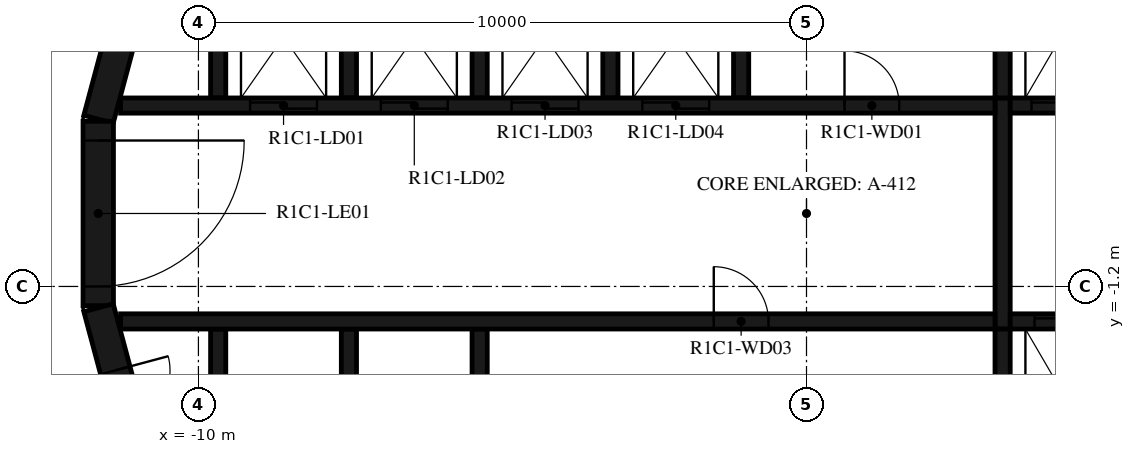
"""IFC4 building model, lengths in metres.
Left out: names, types, materials, properties, quantities, classifications, styles, units other than length and angle.
Written with IfcOpenShell. Run it as: python <this file> out.ifc"""

import sys

from ifc_helpers import new_model, si_unit, direction, frame, frame_2d, origin, place, context, subcontext, project, spatial, polyline, rectangle, outline, extrude, element, fill, save


model = new_model("IFC4")
c1 = context("Model", 3, precision=1e-05, world=origin(), true_north=direction((0.0, 1.0)))
c2 = subcontext(c1, "Body", "Model", "MODEL_VIEW")
j1 = project(units=[si_unit("LENGTHUNIT", "METRE"), si_unit("PLANEANGLEUNIT", "RADIAN")], contexts=[c1])
p1 = place(None, origin())
s1 = spatial("IfcSite", under=j1, at=p1, CompositionType="ELEMENT")
p2 = place(p1, origin())
s2 = spatial("IfcBuilding", under=s1, at=p2, CompositionType="ELEMENT")
p3 = place(p2, frame((0.0, 0.0, 62.9)))
s3 = spatial("IfcBuildingStorey", under=s2, at=p3, CompositionType="ELEMENT", Elevation=62.9)
p4 = place(p3, frame((-10.858, 4.479, 0.0), z_axis=(0.0, 0.0, 1.0), x_axis=(-0.258734743916, -0.965948410781, 0.0)))
e1 = element("IfcWall", 1, at=p4, inside=s3, PredefinedType="SHEAR", context=c2, shape_type="SweptSolid", body=[
    extrude(rectangle(XDim=3.033, YDim=0.5, at=frame_2d((1.516, 0.0))), origin(), (0.0, 0.0, 1.0), 3.12),
])
p5 = place(p3, frame((-11.647, 1.516, 0.0), z_axis=(0.0, 0.0, 1.0), x_axis=(0.0, -1.0, 0.0)))
e2 = element("IfcWall", 2, at=p5, inside=s3, PredefinedType="SHEAR", context=c2, shape_type="SweptSolid", body=[
    extrude(rectangle(XDim=3.033, YDim=0.5, at=frame_2d((1.516, 0.0))), origin(), (0.0, 0.0, 1.0), 3.12),
])
p6 = place(p5, frame((0.316, 0.0, 0.0)))
e3 = element("IfcOpeningElement", 3, at=p6, cuts=e2, PredefinedType="OPENING", context=c2, shape_type="SweptSolid", body=[
    extrude(rectangle(XDim=2.4, YDim=2.1, at=frame_2d((1.2, 1.05))), frame((0.0, 0.26, 0.0), z_axis=(0.0, -1.0, 0.0), x_axis=(1.0, 0.0, 0.0)), (0.0, 0.0, 1.0), 0.52),
])
p7 = place(p3, frame((-11.643, -1.55, 0.0), z_axis=(0.0, 0.0, 1.0), x_axis=(0.258734743916, -0.965948410781, 0.0)))
e4 = element("IfcWall", 4, at=p7, inside=s3, PredefinedType="SHEAR", context=c2, shape_type="SweptSolid", body=[
    extrude(rectangle(XDim=3.033, YDim=0.5, at=frame_2d((1.516, 0.0))), origin(), (0.0, 0.0, 1.0), 3.12),
])
p8 = place(p7, frame((1.066, 0.0, 0.0)))
e5 = element("IfcOpeningElement", 5, at=p8, cuts=e4, PredefinedType="OPENING", context=c2, shape_type="SweptSolid", body=[
    extrude(rectangle(XDim=0.9, YDim=2.1, at=frame_2d((0.45, 1.05))), frame((0.0, 0.26, 0.0), z_axis=(0.0, -1.0, 0.0), x_axis=(1.0, 0.0, 0.0)), (0.0, 0.0, 1.0), 0.52),
])
p9 = place(p3, origin())
e6 = element("IfcWall", 6, at=p9, inside=s3, PredefinedType="SHEAR", context=c2, shape_type="SweptSolid", body=[
    extrude(outline(polyline([(-9.55, 4.8), (-7.65, 4.8), (-7.65, 1.9), (-7.4, 1.9), (-7.4, 4.8), (-5.5, 4.8), (-5.5, 1.9), (-5.25, 1.9), (-5.25, 4.8), (-3.35, 4.8), (-3.35, 1.9), (-3.1, 1.9), (-3.1, 4.8), (-1.2, 4.8), (-1.2, 1.9), (-0.95, 1.9), (-0.95, 4.8), (3.1, 4.8), (3.1, 1.9), (3.35, 1.9), (3.35, 4.8), (5.25, 4.8), (5.25, 1.9), (5.5, 1.9), (5.5, 4.8), (7.4, 4.8), (7.4, 1.9), (7.65, 1.9), (7.65, 4.8), (9.55, 4.8), (9.55, 1.9), (9.8, 1.9), (9.8, 4.8), (9.8, 5.05), (-9.8, 5.05), (-9.8, 4.8), (-9.8, 1.9), (-9.55, 1.9), (-9.55, 4.8)])), origin(), (0.0, 0.0, 1.0), 3.12),
])
p10 = place(p3, origin())
e7 = element("IfcWall", 7, at=p10, inside=s3, PredefinedType="SHEAR", context=c2, shape_type="SweptSolid", body=[
    extrude(outline(polyline([(9.8, -5.05), (9.8, -4.8), (9.8, -1.9), (9.55, -1.9), (9.55, -4.8), (7.65, -4.8), (7.65, -1.9), (7.4, -1.9), (7.4, -4.8), (5.5, -4.8), (5.5, -1.9), (5.25, -1.9), (5.25, -4.8), (3.35, -4.8), (3.35, -1.9), (3.1, -1.9), (3.1, -4.8), (-5.25, -4.8), (-5.25, -1.9), (-5.5, -1.9), (-5.5, -4.8), (-7.4, -4.8), (-7.4, -1.9), (-7.65, -1.9), (-7.65, -4.8), (-9.55, -4.8), (-9.55, -1.9), (-9.8, -1.9), (-9.8, -4.8), (-9.8, -5.05), (9.8, -5.05)])), origin(), (0.0, 0.0, 1.0), 3.12),
])
p11 = place(p3, frame((-11.28, 1.775, 0.0), z_axis=(0.0, 0.0, 1.0), x_axis=(1.0, 0.0, 0.0)))
e8 = element("IfcWall", 8, at=p11, inside=s3, PredefinedType="SHEAR", context=c2, shape_type="SweptSolid", body=[
    extrude(rectangle(XDim=14.38, YDim=0.25, at=frame_2d((7.19, 0.0))), origin(), (0.0, 0.0, 1.0), 3.12),
])
p12 = place(p11, frame((2.13, 0.0, 0.0)))
e9 = element("IfcOpeningElement", 9, at=p12, cuts=e8, PredefinedType="OPENING", context=c2, shape_type="SweptSolid", body=[
    extrude(rectangle(XDim=1.1, YDim=2.1, at=frame_2d((0.55, 1.05))), frame((0.0, 0.135, 0.0), z_axis=(0.0, -1.0, 0.0), x_axis=(1.0, 0.0, 0.0)), (0.0, 0.0, 1.0), 0.27),
])
p13 = place(p11, frame((4.28, 0.0, 0.0)))
e10 = element("IfcOpeningElement", 10, at=p13, cuts=e8, PredefinedType="OPENING", context=c2, shape_type="SweptSolid", body=[
    extrude(rectangle(XDim=1.1, YDim=2.1, at=frame_2d((0.55, 1.05))), frame((0.0, 0.135, 0.0), z_axis=(0.0, -1.0, 0.0), x_axis=(1.0, 0.0, 0.0)), (0.0, 0.0, 1.0), 0.27),
])
p14 = place(p11, frame((6.43, 0.0, 0.0)))
e11 = element("IfcOpeningElement", 11, at=p14, cuts=e8, PredefinedType="OPENING", context=c2, shape_type="SweptSolid", body=[
    extrude(rectangle(XDim=1.1, YDim=2.1, at=frame_2d((0.55, 1.05))), frame((0.0, 0.135, 0.0), z_axis=(0.0, -1.0, 0.0), x_axis=(1.0, 0.0, 0.0)), (0.0, 0.0, 1.0), 0.27),
])
p15 = place(p11, frame((8.58, 0.0, 0.0)))
e12 = element("IfcOpeningElement", 12, at=p15, cuts=e8, PredefinedType="OPENING", context=c2, shape_type="SweptSolid", body=[
    extrude(rectangle(XDim=1.1, YDim=2.1, at=frame_2d((0.55, 1.05))), frame((0.0, 0.135, 0.0), z_axis=(0.0, -1.0, 0.0), x_axis=(1.0, 0.0, 0.0)), (0.0, 0.0, 1.0), 0.27),
])
p16 = place(p11, frame((11.905, 0.0, 0.0)))
e13 = element("IfcOpeningElement", 13, at=p16, cuts=e8, PredefinedType="OPENING", context=c2, shape_type="SweptSolid", body=[
    extrude(rectangle(XDim=0.9, YDim=2.1, at=frame_2d((0.45, 1.05))), frame((0.0, 0.135, 0.0), z_axis=(0.0, -1.0, 0.0), x_axis=(1.0, 0.0, 0.0)), (0.0, 0.0, 1.0), 0.27),
])
p17 = place(p3, frame((3.35, 1.775, 0.0), z_axis=(0.0, 0.0, 1.0), x_axis=(1.0, 0.0, 0.0)))
e14 = element("IfcWall", 14, at=p17, inside=s3, PredefinedType="SHEAR", context=c2, shape_type="SweptSolid", body=[
    extrude(rectangle(XDim=7.93, YDim=0.25, at=frame_2d((3.965, 0.0))), origin(), (0.0, 0.0, 1.0), 3.12),
])
p18 = place(p17, frame((0.35, 0.0, 0.0)))
e15 = element("IfcOpeningElement", 15, at=p18, cuts=e14, PredefinedType="OPENING", context=c2, shape_type="SweptSolid", body=[
    extrude(rectangle(XDim=1.2, YDim=2.4, at=frame_2d((0.6, 1.2))), frame((0.0, 0.135, 0.0), z_axis=(0.0, -1.0, 0.0), x_axis=(1.0, 0.0, 0.0)), (0.0, 0.0, 1.0), 0.27),
])
p19 = place(p17, frame((2.5, 0.0, 0.0)))
e16 = element("IfcOpeningElement", 16, at=p19, cuts=e14, PredefinedType="OPENING", context=c2, shape_type="SweptSolid", body=[
    extrude(rectangle(XDim=1.2, YDim=2.4, at=frame_2d((0.6, 1.2))), frame((0.0, 0.135, 0.0), z_axis=(0.0, -1.0, 0.0), x_axis=(1.0, 0.0, 0.0)), (0.0, 0.0, 1.0), 0.27),
])
p20 = place(p17, frame((4.8, 0.0, 0.0)))
e17 = element("IfcOpeningElement", 17, at=p20, cuts=e14, PredefinedType="OPENING", context=c2, shape_type="SweptSolid", body=[
    extrude(rectangle(XDim=0.9, YDim=2.1, at=frame_2d((0.45, 1.05))), frame((0.0, 0.135, 0.0), z_axis=(0.0, -1.0, 0.0), x_axis=(1.0, 0.0, 0.0)), (0.0, 0.0, 1.0), 0.27),
])
p21 = place(p3, frame((-11.28, -1.775, 0.0), z_axis=(0.0, 0.0, 1.0), x_axis=(1.0, 0.0, 0.0)))
e18 = element("IfcWall", 18, at=p21, inside=s3, PredefinedType="SHEAR", context=c2, shape_type="SweptSolid", body=[
    extrude(rectangle(XDim=14.38, YDim=0.25, at=frame_2d((7.19, 0.0))), origin(), (0.0, 0.0, 1.0), 3.12),
])
p22 = place(p21, frame((9.755, 0.0, 0.0)))
e19 = element("IfcOpeningElement", 19, at=p22, cuts=e18, PredefinedType="OPENING", context=c2, shape_type="SweptSolid", body=[
    extrude(rectangle(XDim=0.9, YDim=2.1, at=frame_2d((0.45, 1.05))), frame((0.0, 0.135, 0.0), z_axis=(0.0, -1.0, 0.0), x_axis=(1.0, 0.0, 0.0)), (0.0, 0.0, 1.0), 0.27),
])
p23 = place(p3, frame((3.35, -1.775, 0.0), z_axis=(0.0, 0.0, 1.0), x_axis=(1.0, 0.0, 0.0)))
e20 = element("IfcWall", 20, at=p23, inside=s3, PredefinedType="SHEAR", context=c2, shape_type="SweptSolid", body=[
    extrude(rectangle(XDim=7.93, YDim=0.25, at=frame_2d((3.965, 0.0))), origin(), (0.0, 0.0, 1.0), 3.12),
])
p24 = place(p23, frame((0.4, 0.0, 0.0)))
e21 = element("IfcOpeningElement", 21, at=p24, cuts=e20, PredefinedType="OPENING", context=c2, shape_type="SweptSolid", body=[
    extrude(rectangle(XDim=1.1, YDim=2.4, at=frame_2d((0.55, 1.2))), frame((0.0, 0.135, 0.0), z_axis=(0.0, -1.0, 0.0), x_axis=(1.0, 0.0, 0.0)), (0.0, 0.0, 1.0), 0.27),
])
p25 = place(p23, frame((2.55, 0.0, 0.0)))
e22 = element("IfcOpeningElement", 22, at=p25, cuts=e20, PredefinedType="OPENING", context=c2, shape_type="SweptSolid", body=[
    extrude(rectangle(XDim=1.1, YDim=2.4, at=frame_2d((0.55, 1.2))), frame((0.0, 0.135, 0.0), z_axis=(0.0, -1.0, 0.0), x_axis=(1.0, 0.0, 0.0)), (0.0, 0.0, 1.0), 0.27),
])
p26 = place(p23, frame((4.7, 0.0, 0.0)))
e23 = element("IfcOpeningElement", 23, at=p26, cuts=e20, PredefinedType="OPENING", context=c2, shape_type="SweptSolid", body=[
    extrude(rectangle(XDim=1.1, YDim=2.4, at=frame_2d((0.55, 1.2))), frame((0.0, 0.135, 0.0), z_axis=(0.0, -1.0, 0.0), x_axis=(1.0, 0.0, 0.0)), (0.0, 0.0, 1.0), 0.27),
])
p27 = place(p3, frame((3.225, -1.9, 0.0), z_axis=(0.0, 0.0, 1.0), x_axis=(0.0, 1.0, 0.0)))
e24 = element("IfcWall", 24, at=p27, inside=s3, PredefinedType="SHEAR", context=c2, shape_type="SweptSolid", body=[
    extrude(rectangle(XDim=3.8, YDim=0.25, at=frame_2d((1.9, 0.0))), origin(), (0.0, 0.0, 1.0), 3.12),
])
p28 = place(p6, origin())
e25 = element("IfcDoor", 25, at=p28, inside=s3, OperationType="DOUBLE_DOOR_SINGLE_SWING", PredefinedType="DOOR", context=c2, shape_type="SweptSolid", body=[
    extrude(rectangle(XDim=2.4, YDim=2.1, at=frame_2d((1.2, 1.05))), frame((0.0, 0.025, 0.0), z_axis=(0.0, -1.0, 0.0), x_axis=(1.0, 0.0, 0.0)), (0.0, 0.0, 1.0), 0.05),
])
fill(e3, e25)
p29 = place(p12, origin())
e26 = element("IfcDoor", 26, at=p29, inside=s3, OperationType="DOUBLE_DOOR_SLIDING", PredefinedType="DOOR", context=c2, shape_type="SweptSolid", body=[
    extrude(rectangle(XDim=1.1, YDim=2.1, at=frame_2d((0.55, 1.05))), frame((0.0, 0.025, 0.0), z_axis=(0.0, -1.0, 0.0), x_axis=(1.0, 0.0, 0.0)), (0.0, 0.0, 1.0), 0.05),
])
fill(e9, e26)
p30 = place(p13, origin())
e27 = element("IfcDoor", 27, at=p30, inside=s3, OperationType="DOUBLE_DOOR_SLIDING", PredefinedType="DOOR", context=c2, shape_type="SweptSolid", body=[
    extrude(rectangle(XDim=1.1, YDim=2.1, at=frame_2d((0.55, 1.05))), frame((0.0, 0.025, 0.0), z_axis=(0.0, -1.0, 0.0), x_axis=(1.0, 0.0, 0.0)), (0.0, 0.0, 1.0), 0.05),
])
fill(e10, e27)
p31 = place(p14, origin())
e28 = element("IfcDoor", 28, at=p31, inside=s3, OperationType="DOUBLE_DOOR_SLIDING", PredefinedType="DOOR", context=c2, shape_type="SweptSolid", body=[
    extrude(rectangle(XDim=1.1, YDim=2.1, at=frame_2d((0.55, 1.05))), frame((0.0, 0.025, 0.0), z_axis=(0.0, -1.0, 0.0), x_axis=(1.0, 0.0, 0.0)), (0.0, 0.0, 1.0), 0.05),
])
fill(e11, e28)
p32 = place(p15, origin())
e29 = element("IfcDoor", 29, at=p32, inside=s3, OperationType="DOUBLE_DOOR_SLIDING", PredefinedType="DOOR", context=c2, shape_type="SweptSolid", body=[
    extrude(rectangle(XDim=1.1, YDim=2.1, at=frame_2d((0.55, 1.05))), frame((0.0, 0.025, 0.0), z_axis=(0.0, -1.0, 0.0), x_axis=(1.0, 0.0, 0.0)), (0.0, 0.0, 1.0), 0.05),
])
fill(e12, e29)
p33 = place(p18, origin())
e30 = element("IfcDoor", 30, at=p33, inside=s3, OperationType="DOUBLE_DOOR_SLIDING", PredefinedType="DOOR", context=c2, shape_type="SweptSolid", body=[
    extrude(rectangle(XDim=1.2, YDim=2.4, at=frame_2d((0.6, 1.2))), frame((0.0, 0.025, 0.0), z_axis=(0.0, -1.0, 0.0), x_axis=(1.0, 0.0, 0.0)), (0.0, 0.0, 1.0), 0.05),
])
fill(e15, e30)
p34 = place(p24, origin())
e31 = element("IfcDoor", 31, at=p34, inside=s3, OperationType="DOUBLE_DOOR_SLIDING", PredefinedType="DOOR", context=c2, shape_type="SweptSolid", body=[
    extrude(rectangle(XDim=1.1, YDim=2.4, at=frame_2d((0.55, 1.2))), frame((0.0, 0.025, 0.0), z_axis=(0.0, -1.0, 0.0), x_axis=(1.0, 0.0, 0.0)), (0.0, 0.0, 1.0), 0.05),
])
fill(e21, e31)
p35 = place(p16, origin())
e32 = element("IfcDoor", 32, at=p35, inside=s3, OperationType="SINGLE_SWING_RIGHT", PredefinedType="DOOR", context=c2, shape_type="SweptSolid", body=[
    extrude(rectangle(XDim=0.9, YDim=2.1, at=frame_2d((0.45, 1.05))), frame((0.0, 0.025, 0.0), z_axis=(0.0, -1.0, 0.0), x_axis=(1.0, 0.0, 0.0)), (0.0, 0.0, 1.0), 0.05),
])
fill(e13, e32)
p36 = place(p22, origin())
e33 = element("IfcDoor", 33, at=p36, inside=s3, OperationType="SINGLE_SWING_RIGHT", PredefinedType="DOOR", context=c2, shape_type="SweptSolid", body=[
    extrude(rectangle(XDim=0.9, YDim=2.1, at=frame_2d((0.45, 1.05))), frame((0.0, 0.025, 0.0), z_axis=(0.0, -1.0, 0.0), x_axis=(1.0, 0.0, 0.0)), (0.0, 0.0, 1.0), 0.05),
])
fill(e19, e33)
p37 = place(p8, origin())
e34 = element("IfcDoor", 34, at=p37, inside=s3, OperationType="SINGLE_SWING_LEFT", PredefinedType="DOOR", context=c2, shape_type="SweptSolid", body=[
    extrude(rectangle(XDim=0.9, YDim=2.1, at=frame_2d((0.45, 1.05))), frame((0.0, 0.025, 0.0), z_axis=(0.0, -1.0, 0.0), x_axis=(1.0, 0.0, 0.0)), (0.0, 0.0, 1.0), 0.05),
])
fill(e5, e34)
save(model, sys.argv[1])
